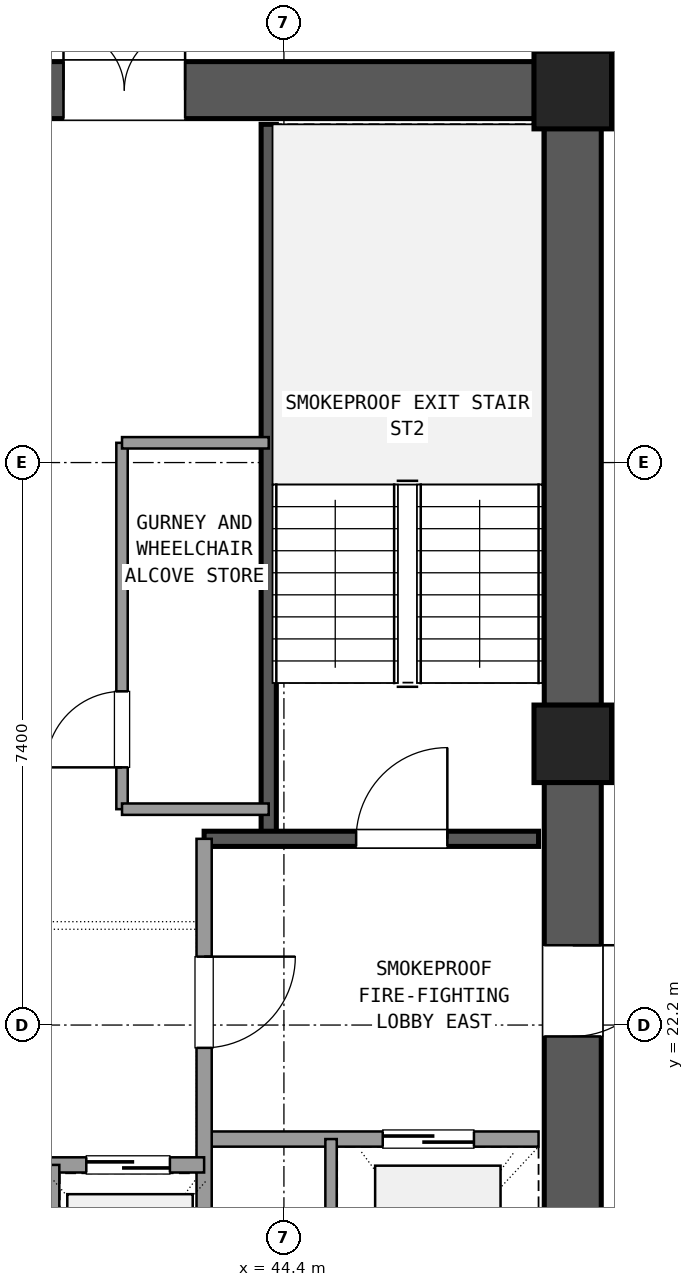
"""IFC4 building model, lengths in metres.
Left out: names, types, materials, properties, quantities, classifications, styles, units other than length and angle.
Written with IfcOpenShell. Run it as: python <this file> out.ifc"""

import sys

from ifc_helpers import new_model, si_unit, direction, frame, frame_2d, origin, origin_2d, place, context, subcontext, project, spatial, rectangle, extrude, element, fill, save


model = new_model("IFC4")
c1 = context("Model", 3, precision=1e-05, world=origin(), true_north=direction((0.0, 1.0)))
c2 = subcontext(c1, "Body", "Model", "MODEL_VIEW")
j1 = project(units=[si_unit("LENGTHUNIT", "METRE"), si_unit("PLANEANGLEUNIT", "RADIAN")], contexts=[c1])
p1 = place(None, origin())
s1 = spatial("IfcSite", under=j1, at=p1, CompositionType="ELEMENT")
p2 = place(p1, origin())
s2 = spatial("IfcBuilding", under=s1, at=p2, CompositionType="ELEMENT")
p3 = place(p2, frame((0.0, 0.0, 145.62)))
s3 = spatial("IfcBuildingStorey", under=s2, at=p3, CompositionType="ELEMENT", Elevation=145.62)
for number, where, z_axis, x_axis in (
    (1, (48.2, 25.9, 0.0), (0.0, 0.0, 1.0), (1.0, 0.0, 0.0)),
    (2, (48.2, 34.5, 0.0), (0.0, 0.0, 1.0), (1.0, 0.0, 0.0)),
):
    element("IfcColumn", number, at=place(p3, frame(where, z_axis=z_axis, x_axis=x_axis)), inside=s3, PredefinedType="COLUMN", context=c2, shape_type="SweptSolid", body=[
        extrude(rectangle(XDim=1.02, YDim=1.02, at=origin_2d()), origin(), (0.0, 0.0, 1.0), 3.6),
    ])
p4 = place(p3, frame((48.2, 17.805, 0.0), z_axis=(0.0, 0.0, 1.0), x_axis=(0.0, 1.0, 0.0)))
e3 = element("IfcWall", 3, at=p4, inside=s3, PredefinedType="SHEAR", context=c2, shape_type="SweptSolid", body=[
    extrude(rectangle(XDim=7.59, YDim=0.75, at=frame_2d((3.795, 0.0))), origin(), (0.0, 0.0, 1.0), 3.32),
])
p5 = place(p4, frame((4.245, 0.0, 0.0)))
e4 = element("IfcOpeningElement", 4, at=p5, cuts=e3, PredefinedType="OPENING", context=c2, shape_type="SweptSolid", body=[
    extrude(rectangle(XDim=1.2, YDim=2.15, at=frame_2d((0.6, 1.075))), frame((0.0, 0.385, 0.0), z_axis=(0.0, -1.0, 0.0), x_axis=(1.0, 0.0, 0.0)), (0.0, 0.0, 1.0), 0.77),
])
p6 = place(p3, frame((48.2, 26.405, 0.0), z_axis=(0.0, 0.0, 1.0), x_axis=(0.0, 1.0, 0.0)))
e5 = element("IfcWall", 5, at=p6, inside=s3, PredefinedType="SHEAR", context=c2, shape_type="SweptSolid", body=[
    extrude(rectangle(XDim=7.59, YDim=0.75, at=frame_2d((3.795, 0.0))), origin(), (0.0, 0.0, 1.0), 3.32),
])
p7 = place(p3, frame((47.695, 34.5, 0.0), z_axis=(0.0, 0.0, 1.0), x_axis=(-1.0, 0.0, 0.0)))
e6 = element("IfcWall", 6, at=p7, inside=s3, PredefinedType="SHEAR", context=c2, shape_type="SweptSolid", body=[
    extrude(rectangle(XDim=10.19, YDim=0.75, at=frame_2d((5.095, 0.0))), origin(), (0.0, 0.0, 1.0), 3.32),
])
p8 = place(p7, frame((4.595, 0.0, 0.0)))
e7 = element("IfcOpeningElement", 7, at=p8, cuts=e6, PredefinedType="OPENING", context=c2, shape_type="SweptSolid", body=[
    extrude(rectangle(XDim=1.6, YDim=2.2, at=frame_2d((0.8, 1.1))), frame((0.0, 0.385, 0.0), z_axis=(0.0, -1.0, 0.0), x_axis=(1.0, 0.0, 0.0)), (0.0, 0.0, 1.0), 0.77),
])
p9 = place(p3, frame((44.2, 24.65, 0.0), z_axis=(0.0, 0.0, 1.0), x_axis=(0.0, 1.0, 0.0)))
e8 = element("IfcWall", 8, at=p9, inside=s3, PredefinedType="SHEAR", context=c2, shape_type="SweptSolid", body=[
    extrude(rectangle(XDim=9.4, YDim=0.2, at=frame_2d((4.7, 0.0))), origin(), (0.0, 0.0, 1.0), 3.32),
])
p10 = place(p3, frame((43.35, 24.65, 0.0), z_axis=(0.0, 0.0, 1.0), x_axis=(1.0, 0.0, 0.0)))
e9 = element("IfcWall", 9, at=p10, inside=s3, PredefinedType="SHEAR", context=c2, shape_type="SweptSolid", body=[
    extrude(rectangle(XDim=4.4, YDim=0.2, at=frame_2d((2.2, 0.0))), origin(), (0.0, 0.0, 1.0), 3.32),
])
p11 = place(p10, frame((2.0, 0.0, 0.0)))
e10 = element("IfcOpeningElement", 10, at=p11, cuts=e9, PredefinedType="OPENING", context=c2, shape_type="SweptSolid", body=[
    extrude(rectangle(XDim=1.2, YDim=2.15, at=frame_2d((0.6, 1.075))), frame((0.0, 0.11, 0.0), z_axis=(0.0, -1.0, 0.0), x_axis=(1.0, 0.0, 0.0)), (0.0, 0.0, 1.0), 0.22),
])
p12 = place(p3, frame((43.35, 20.7, 0.0), z_axis=(0.0, 0.0, 1.0), x_axis=(1.0, 0.0, 0.0)))
e11 = element("IfcWall", 11, at=p12, inside=s3, PredefinedType="SOLIDWALL", context=c2, shape_type="SweptSolid", body=[
    extrude(rectangle(XDim=4.4, YDim=0.2, at=frame_2d((2.2, 0.0))), origin(), (0.0, 0.0, 1.0), 2.61),
])
p13 = place(p12, frame((2.35, 0.0, 0.0)))
e12 = element("IfcOpeningElement", 12, at=p13, cuts=e11, PredefinedType="OPENING", context=c2, shape_type="SweptSolid", body=[
    extrude(rectangle(XDim=1.2, YDim=2.15, at=frame_2d((0.6, 1.075))), frame((0.0, 0.11, 0.0), z_axis=(0.0, -1.0, 0.0), x_axis=(1.0, 0.0, 0.0)), (0.0, 0.0, 1.0), 0.22),
])
p14 = place(p3, frame((43.35, 17.75, 0.0), z_axis=(0.0, 0.0, 1.0), x_axis=(0.0, 1.0, 0.0)))
e13 = element("IfcWall", 13, at=p14, inside=s3, PredefinedType="SOLIDWALL", context=c2, shape_type="SweptSolid", body=[
    extrude(rectangle(XDim=6.9, YDim=0.2, at=frame_2d((3.45, 0.0))), origin(), (0.0, 0.0, 1.0), 2.61),
])
p15 = place(p14, frame((4.15, 0.0, 0.0)))
e14 = element("IfcOpeningElement", 14, at=p15, cuts=e13, PredefinedType="OPENING", context=c2, shape_type="SweptSolid", body=[
    extrude(rectangle(XDim=1.2, YDim=2.15, at=frame_2d((0.6, 1.075))), frame((0.0, 0.11, 0.0), z_axis=(0.0, -1.0, 0.0), x_axis=(1.0, 0.0, 0.0)), (0.0, 0.0, 1.0), 0.22),
])
p16 = place(p3, frame((45.02, 17.75, 0.0), z_axis=(0.0, 0.0, 1.0), x_axis=(0.0, 1.0, 0.0)))
e15 = element("IfcWall", 15, at=p16, inside=s3, PredefinedType="PARTITIONING", context=c2, shape_type="SweptSolid", body=[
    extrude(rectangle(XDim=2.95, YDim=0.15, at=frame_2d((1.475, 0.0))), origin(), (0.0, 0.0, 1.0), 2.61),
])
p17 = place(p3, frame((37.25, 20.36, 0.0), z_axis=(0.0, 0.0, 1.0), x_axis=(1.0, 0.0, 0.0)))
e16 = element("IfcWall", 16, at=p17, inside=s3, PredefinedType="SOLIDWALL", context=c2, shape_type="SweptSolid", body=[
    extrude(rectangle(XDim=6.1, YDim=0.2, at=frame_2d((3.05, 0.0))), origin(), (0.0, 0.0, 1.0), 2.61),
])
p18 = place(p17, frame((0.45, 0.0, 0.0)))
e17 = element("IfcOpeningElement", 17, at=p18, cuts=e16, PredefinedType="OPENING", context=c2, shape_type="SweptSolid", body=[
    extrude(rectangle(XDim=1.1, YDim=2.15, at=frame_2d((0.55, 1.075))), frame((0.0, 0.11, 0.0), z_axis=(0.0, -1.0, 0.0), x_axis=(1.0, 0.0, 0.0)), (0.0, 0.0, 1.0), 0.22),
])
p19 = place(p17, frame((2.5, 0.0, 0.0)))
e18 = element("IfcOpeningElement", 18, at=p19, cuts=e16, PredefinedType="OPENING", context=c2, shape_type="SweptSolid", body=[
    extrude(rectangle(XDim=1.1, YDim=2.15, at=frame_2d((0.55, 1.075))), frame((0.0, 0.11, 0.0), z_axis=(0.0, -1.0, 0.0), x_axis=(1.0, 0.0, 0.0)), (0.0, 0.0, 1.0), 0.22),
])
p20 = place(p17, frame((4.55, 0.0, 0.0)))
e19 = element("IfcOpeningElement", 19, at=p20, cuts=e16, PredefinedType="OPENING", context=c2, shape_type="SweptSolid", body=[
    extrude(rectangle(XDim=1.1, YDim=2.15, at=frame_2d((0.55, 1.075))), frame((0.0, 0.11, 0.0), z_axis=(0.0, -1.0, 0.0), x_axis=(1.0, 0.0, 0.0)), (0.0, 0.0, 1.0), 0.22),
])
p21 = place(p3, frame((41.37, 17.75, 0.0), z_axis=(0.0, 0.0, 1.0), x_axis=(0.0, 1.0, 0.0)))
e20 = element("IfcWall", 20, at=p21, inside=s3, PredefinedType="PARTITIONING", context=c2, shape_type="SweptSolid", body=[
    extrude(rectangle(XDim=2.61, YDim=0.15, at=frame_2d((1.305, 0.0))), origin(), (0.0, 0.0, 1.0), 2.61),
])
p22 = place(p3, frame((42.27, 25.04, 0.0), z_axis=(0.0, 0.0, 1.0), x_axis=(0.0, 1.0, 0.0)))
e21 = element("IfcWall", 21, at=p22, inside=s3, PredefinedType="PARTITIONING", context=c2, shape_type="SweptSolid", body=[
    extrude(rectangle(XDim=4.82, YDim=0.15, at=frame_2d((2.41, 0.0))), origin(), (0.0, 0.0, 1.0), 2.61),
])
p23 = place(p22, frame((0.55, 0.0, 0.0)))
e22 = element("IfcOpeningElement", 22, at=p23, cuts=e21, PredefinedType="OPENING", context=c2, shape_type="SweptSolid", body=[
    extrude(rectangle(XDim=1.0, YDim=2.15, at=frame_2d((0.5, 1.075))), frame((0.0, 0.085, 0.0), z_axis=(0.0, -1.0, 0.0), x_axis=(1.0, 0.0, 0.0)), (0.0, 0.0, 1.0), 0.17),
])
for number, where, z_axis, x_axis in (
    (23, (42.27, 25.04, 0.0), (0.0, 0.0, 1.0), (1.0, 0.0, 0.0)),
    (24, (42.27, 29.86, 0.0), (0.0, 0.0, 1.0), (1.0, 0.0, 0.0)),
):
    element("IfcWall", number, at=place(p3, frame(where, z_axis=z_axis, x_axis=x_axis)), inside=s3, PredefinedType="PARTITIONING", context=c2, shape_type="SweptSolid", body=[
        extrude(rectangle(XDim=1.93, YDim=0.15, at=frame_2d((0.965, 0.0))), origin(), (0.0, 0.0, 1.0), 2.61),
    ])
p24 = place(p11, origin())
e25 = element("IfcDoor", 25, at=p24, inside=s3, OperationType="SINGLE_SWING_RIGHT", PredefinedType="DOOR", context=c2, shape_type="SweptSolid", body=[
    extrude(rectangle(XDim=1.2, YDim=2.15, at=frame_2d((0.6, 1.075))), frame((0.0, 0.025, 0.0), z_axis=(0.0, -1.0, 0.0), x_axis=(1.0, 0.0, 0.0)), (0.0, 0.0, 1.0), 0.05),
])
fill(e10, e25)
p25 = place(p13, origin())
e26 = element("IfcDoor", 26, at=p25, inside=s3, OperationType="SLIDING_TO_RIGHT", PredefinedType="DOOR", context=c2, shape_type="SweptSolid", body=[
    extrude(rectangle(XDim=1.2, YDim=2.15, at=frame_2d((0.6, 1.075))), frame((0.0, 0.025, 0.0), z_axis=(0.0, -1.0, 0.0), x_axis=(1.0, 0.0, 0.0)), (0.0, 0.0, 1.0), 0.05),
])
fill(e12, e26)
p26 = place(p15, frame((1.2, 0.0, 0.0), z_axis=(0.0, 0.0, 1.0), x_axis=(-1.0, 0.0, 0.0)))
e27 = element("IfcDoor", 27, at=p26, inside=s3, OperationType="SINGLE_SWING_RIGHT", PredefinedType="DOOR", context=c2, shape_type="SweptSolid", body=[
    extrude(rectangle(XDim=1.2, YDim=2.15, at=frame_2d((0.6, 1.075))), frame((0.0, 0.025, 0.0), z_axis=(0.0, -1.0, 0.0), x_axis=(1.0, 0.0, 0.0)), (0.0, 0.0, 1.0), 0.05),
])
fill(e14, e27)
p27 = place(p5, frame((1.2, 0.0, 0.0), z_axis=(0.0, 0.0, 1.0), x_axis=(-1.0, 0.0, 0.0)))
e28 = element("IfcDoor", 28, at=p27, inside=s3, OperationType="SINGLE_SWING_RIGHT", PredefinedType="DOOR", context=c2, shape_type="SweptSolid", body=[
    extrude(rectangle(XDim=1.2, YDim=2.15, at=frame_2d((0.6, 1.075))), frame((0.0, 0.025, 0.0), z_axis=(0.0, -1.0, 0.0), x_axis=(1.0, 0.0, 0.0)), (0.0, 0.0, 1.0), 0.05),
])
fill(e4, e28)
p28 = place(p8, frame((1.6, 0.0, 0.0), z_axis=(0.0, 0.0, 1.0), x_axis=(-1.0, 0.0, 0.0)))
e29 = element("IfcDoor", 29, at=p28, inside=s3, OperationType="DOUBLE_DOOR_SINGLE_SWING", PredefinedType="DOOR", context=c2, shape_type="SweptSolid", body=[
    extrude(rectangle(XDim=1.6, YDim=2.2, at=frame_2d((0.8, 1.1))), frame((0.0, 0.025, 0.0), z_axis=(0.0, -1.0, 0.0), x_axis=(1.0, 0.0, 0.0)), (0.0, 0.0, 1.0), 0.05),
])
fill(e7, e29)
p29 = place(p20, origin())
e30 = element("IfcDoor", 30, at=p29, inside=s3, OperationType="SLIDING_TO_LEFT", PredefinedType="DOOR", context=c2, shape_type="SweptSolid", body=[
    extrude(rectangle(XDim=1.1, YDim=2.15, at=frame_2d((0.55, 1.075))), frame((0.0, 0.025, 0.0), z_axis=(0.0, -1.0, 0.0), x_axis=(1.0, 0.0, 0.0)), (0.0, 0.0, 1.0), 0.05),
])
fill(e19, e30)
p30 = place(p23, origin())
e31 = element("IfcDoor", 31, at=p30, inside=s3, OperationType="SINGLE_SWING_LEFT", PredefinedType="DOOR", context=c2, shape_type="SweptSolid", body=[
    extrude(rectangle(XDim=1.0, YDim=2.15, at=frame_2d((0.5, 1.075))), frame((0.0, 0.025, 0.0), z_axis=(0.0, -1.0, 0.0), x_axis=(1.0, 0.0, 0.0)), (0.0, 0.0, 1.0), 0.05),
])
fill(e22, e31)
save(model, sys.argv[1])
